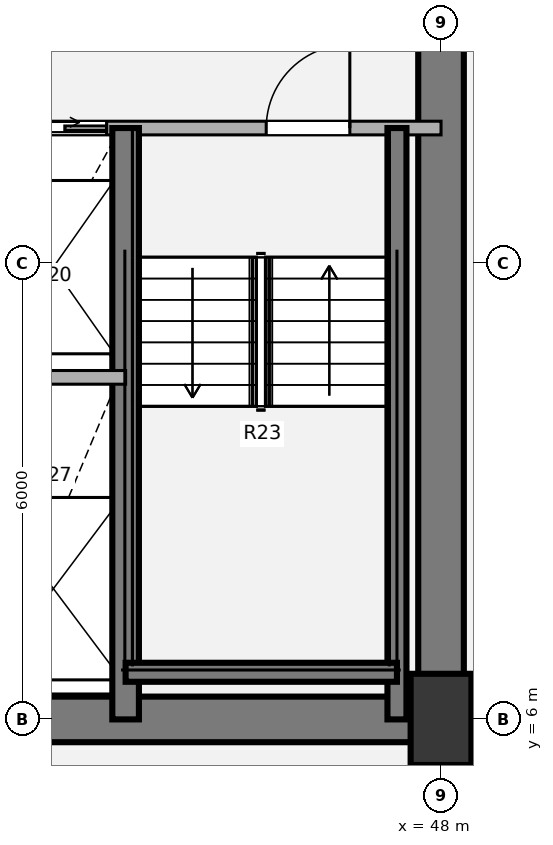
"""IFC4 building model, lengths in metres.
Left out: names, types, materials, properties, quantities, classifications, styles, units other than length and angle.
Written with IfcOpenShell. Run it as: python <this file> out.ifc"""

import sys

from ifc_helpers import new_model, si_unit, direction, frame, frame_2d, origin, origin_2d, place, context, subcontext, project, spatial, rectangle, extrude, source, transform, mapped, element, fill, save


model = new_model("IFC4")
c1 = context("Model", 3, precision=1e-05, world=origin(), true_north=direction((0.0, 1.0)))
c2 = subcontext(c1, "Body", "Model", "MODEL_VIEW")
j1 = project(units=[si_unit("LENGTHUNIT", "METRE"), si_unit("PLANEANGLEUNIT", "RADIAN")], contexts=[c1])
p1 = place(None, origin())
s1 = spatial("IfcSite", under=j1, at=p1, CompositionType="ELEMENT")
p2 = place(p1, origin())
s2 = spatial("IfcBuilding", under=s1, at=p2, CompositionType="ELEMENT")
p3 = place(p2, frame((0.0, 0.0, 79.92)))
s3 = spatial("IfcBuildingStorey", under=s2, at=p3, CompositionType="ELEMENT", Elevation=79.92)
m1 = source(origin(), c2, "Body", "SweptSolid", [
    extrude(rectangle(XDim=0.8, YDim=1.2, at=origin_2d()), origin(), (0.0, 0.0, 1.0), 5.4),
])
p4 = place(p3, frame((48.0, 6.0, 0.0), z_axis=(0.0, 0.0, 1.0), x_axis=(1.0, 0.0, 0.0)))
e1 = element("IfcColumn", 1, at=p4, inside=s3, PredefinedType="COLUMN", context=c2, shape_type="MappedRepresentation", body=[
    mapped(m1, transform((0.0, 0.0, 0.0), x_axis=(1.0, 0.0, 0.0), y_axis=(0.0, 1.0, 0.0), z_axis=(0.0, 0.0, 1.0), scale=1.0)),
])
p5 = place(p3, frame((48.3, 6.0, 0.0), z_axis=(0.0, 0.0, 1.0), x_axis=(-1.0, 0.0, 0.0)))
e2 = element("IfcWall", 2, at=p5, inside=s3, PredefinedType="SHEAR", context=c2, shape_type="SweptSolid", body=[
    extrude(rectangle(XDim=24.6, YDim=0.6, at=frame_2d((12.3, 0.0))), origin(), (0.0, 0.0, 1.0), 5.4),
])
p6 = place(p3, frame((48.0, 18.0, 0.0), z_axis=(0.0, 0.0, 1.0), x_axis=(0.0, -1.0, 0.0)))
e3 = element("IfcWall", 3, at=p6, inside=s3, PredefinedType="SHEAR", context=c2, shape_type="SweptSolid", body=[
    extrude(rectangle(XDim=12.0, YDim=0.6, at=frame_2d((6.0, 0.0))), origin(), (0.0, 0.0, 1.0), 5.4),
])
p7 = place(p3, frame((41.9, 13.78, 0.0), z_axis=(0.0, 0.0, 1.0), x_axis=(1.0, 0.0, 0.0)))
e4 = element("IfcWall", 4, at=p7, inside=s3, PredefinedType="PARTITIONING", context=c2, shape_type="SweptSolid", body=[
    extrude(rectangle(XDim=6.1, YDim=0.18, at=frame_2d((3.05, 0.0))), origin(), (0.0, 0.0, 1.0), 2.229),
])
p8 = place(p7, frame((0.6, 0.0, 0.0)))
e5 = element("IfcOpeningElement", 5, at=p8, cuts=e4, PredefinedType="OPENING", context=c2, shape_type="SweptSolid", body=[
    extrude(rectangle(XDim=1.1, YDim=2.1, at=origin_2d()), frame((0.55, 0.1, 1.05), z_axis=(0.0, -1.0, 0.0), x_axis=(1.0, 0.0, 0.0)), (0.0, 0.0, 1.0), 0.2),
])
p9 = place(p7, frame((3.8, 0.0, 0.0)))
e6 = element("IfcOpeningElement", 6, at=p9, cuts=e4, PredefinedType="OPENING", context=c2, shape_type="SweptSolid", body=[
    extrude(rectangle(XDim=1.1, YDim=2.1, at=origin_2d()), frame((0.55, 0.1, 1.05), z_axis=(0.0, -1.0, 0.0), x_axis=(1.0, 0.0, 0.0)), (0.0, 0.0, 1.0), 0.2),
])
p10 = place(p3, frame((43.85, 6.0, 0.0), z_axis=(0.0, 0.0, 1.0), x_axis=(0.0, 1.0, 0.0)))
e7 = element("IfcWall", 7, at=p10, inside=s3, PredefinedType="SHEAR", context=c2, shape_type="SweptSolid", body=[
    extrude(rectangle(XDim=7.78, YDim=0.35, at=frame_2d((3.89, 0.0))), origin(), (0.0, 0.0, 1.0), 5.4),
])
p11 = place(p3, frame((47.42, 6.0, 0.0), z_axis=(0.0, 0.0, 1.0), x_axis=(0.0, 1.0, 0.0)))
e8 = element("IfcWall", 8, at=p11, inside=s3, PredefinedType="SHEAR", context=c2, shape_type="SweptSolid", body=[
    extrude(rectangle(XDim=7.78, YDim=0.25, at=frame_2d((3.89, 0.0))), origin(), (0.0, 0.0, 1.0), 5.4),
])
p12 = place(p3, frame((43.85, 6.62, 0.0), z_axis=(0.0, 0.0, 1.0), x_axis=(1.0, 0.0, 0.0)))
e9 = element("IfcWall", 9, at=p12, inside=s3, PredefinedType="SHEAR", context=c2, shape_type="SweptSolid", body=[
    extrude(rectangle(XDim=3.57, YDim=0.25, at=frame_2d((1.785, 0.0))), origin(), (0.0, 0.0, 1.0), 5.4),
])
p13 = place(p3, frame((41.9, 10.5, 0.0), z_axis=(0.0, 0.0, 1.0), x_axis=(1.0, 0.0, 0.0)))
e10 = element("IfcWall", 10, at=p13, inside=s3, PredefinedType="PARTITIONING", context=c2, shape_type="SweptSolid", body=[
    extrude(rectangle(XDim=1.95, YDim=0.18, at=frame_2d((0.975, 0.0))), origin(), (0.0, 0.0, 1.0), 5.05),
])
m2 = source(origin(), c2, "Body", "SweptSolid", [
    extrude(rectangle(XDim=1.1, YDim=2.1, at=origin_2d()), frame((0.55, 0.025, 1.05), z_axis=(0.0, -1.0, 0.0), x_axis=(1.0, 0.0, 0.0)), (0.0, 0.0, 1.0), 0.05),
])
p14 = place(p8, origin())
e11 = element("IfcDoor", 11, at=p14, inside=s3, OperationType="SLIDING_TO_RIGHT", PredefinedType="DOOR", context=c2, shape_type="MappedRepresentation", body=[
    mapped(m2, transform((0.0, 0.0, 0.0), x_axis=(1.0, 0.0, 0.0), y_axis=(0.0, 1.0, 0.0), z_axis=(0.0, 0.0, 1.0), scale=1.0)),
])
fill(e5, e11)
m3 = source(origin(), c2, "Body", "SweptSolid", [
    extrude(rectangle(XDim=1.1, YDim=2.1, at=origin_2d()), frame((0.55, 0.025, 1.05), z_axis=(0.0, -1.0, 0.0), x_axis=(1.0, 0.0, 0.0)), (0.0, 0.0, 1.0), 0.05),
])
p15 = place(p9, origin())
e12 = element("IfcDoor", 12, at=p15, inside=s3, OperationType="SINGLE_SWING_RIGHT", PredefinedType="DOOR", context=c2, shape_type="MappedRepresentation", body=[
    mapped(m3, transform((0.0, 0.0, 0.0), x_axis=(1.0, 0.0, 0.0), y_axis=(0.0, 1.0, 0.0), z_axis=(0.0, 0.0, 1.0), scale=1.0)),
])
fill(e6, e12)
save(model, sys.argv[1])
